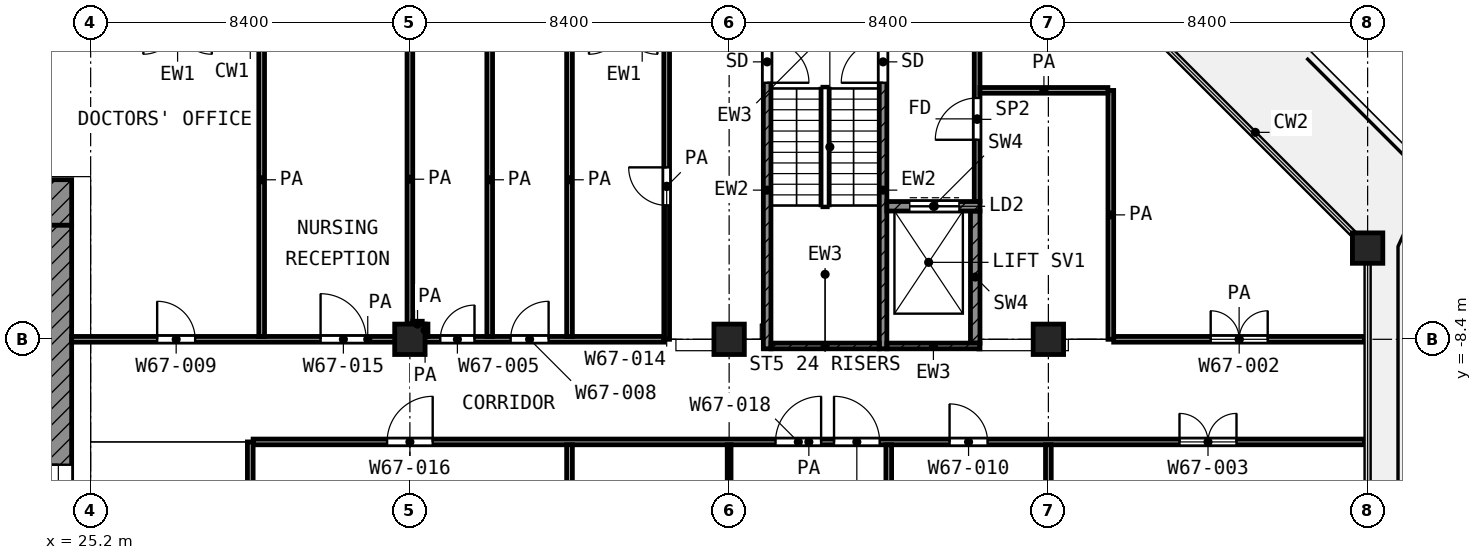
"""IFC4 building model, lengths in metres.
Left out: names, types, materials, properties, quantities, classifications, styles, units other than length and angle.
Written with IfcOpenShell. Run it as: python <this file> out.ifc"""

import sys

from ifc_helpers import new_model, si_unit, direction, frame, frame_2d, origin, origin_2d, place, context, subcontext, project, spatial, rectangle, extrude, element, fill, save


model = new_model("IFC4")
c1 = context("Model", 3, precision=1e-05, world=origin(), true_north=direction((0.0, 1.0)))
c2 = subcontext(c1, "Body", "Model", "MODEL_VIEW")
j1 = project(units=[si_unit("LENGTHUNIT", "METRE"), si_unit("PLANEANGLEUNIT", "RADIAN")], contexts=[c1])
p1 = place(None, origin())
s1 = spatial("IfcSite", under=j1, at=p1, CompositionType="ELEMENT")
p2 = place(p1, origin())
s2 = spatial("IfcBuilding", under=s1, at=p2, CompositionType="ELEMENT")
p3 = place(p2, frame((0.0, 0.0, 290.2)))
s3 = spatial("IfcBuildingStorey", under=s2, at=p3, CompositionType="ELEMENT", Elevation=290.2)
for number, where, z_axis, x_axis in (
    (1, (58.8, -6.0, 0.0), (0.0, 0.0, 1.0), (1.0, 0.0, 0.0)),
    (2, (33.6, -8.4, 0.0), (0.0, 0.0, 1.0), (1.0, 0.0, 0.0)),
    (3, (42.0, -8.4, 0.0), (0.0, 0.0, 1.0), (1.0, 0.0, 0.0)),
    (4, (50.4, -8.4, 0.0), (0.0, 0.0, 1.0), (1.0, 0.0, 0.0)),
):
    element("IfcColumn", number, at=place(p3, frame(where, z_axis=z_axis, x_axis=x_axis)), inside=s3, PredefinedType="COLUMN", context=c2, shape_type="SweptSolid", body=[
        extrude(rectangle(XDim=0.8, YDim=0.8, at=origin_2d()), origin(), (0.0, 0.0, 1.0), 4.2),
    ])
p4 = place(p3, frame((4.2, -4.8, 0.0), z_axis=(0.0, 0.0, 1.0), x_axis=(1.0, 0.0, 0.0)))
e5 = element("IfcWall", 5, at=p4, inside=s3, PredefinedType="SHEAR", context=c2, shape_type="SweptSolid", body=[
    extrude(rectangle(XDim=20.5, YDim=1.2, at=frame_2d((10.25, 0.0))), origin(), (0.0, 0.0, 1.0), 3.6),
])
p5 = place(p4, frame((1.95, 0.0, 0.0)))
e6 = element("IfcOpeningElement", 6, at=p5, cuts=e5, PredefinedType="OPENING", context=c2, shape_type="SweptSolid", body=[
    extrude(rectangle(XDim=1.1, YDim=2.1, at=frame_2d((0.55, 1.05))), frame((0.0, 0.61, 0.0), z_axis=(0.0, -1.0, 0.0), x_axis=(1.0, 0.0, 0.0)), (0.0, 0.0, 1.0), 1.22),
])
p6 = place(p4, frame((17.95, 0.0, 0.0)))
e7 = element("IfcOpeningElement", 7, at=p6, cuts=e5, PredefinedType="OPENING", context=c2, shape_type="SweptSolid", body=[
    extrude(rectangle(XDim=1.1, YDim=2.1, at=frame_2d((0.55, 1.05))), frame((0.0, 0.61, 0.0), z_axis=(0.0, -1.0, 0.0), x_axis=(1.0, 0.0, 0.0)), (0.0, 0.0, 1.0), 1.22),
])
p7 = place(p3, frame((24.35, -24.0, 0.0), z_axis=(0.0, 0.0, 1.0), x_axis=(0.0, 1.0, 0.0)))
e8 = element("IfcWall", 8, at=p7, inside=s3, PredefinedType="SHEAR", context=c2, shape_type="SweptSolid", body=[
    extrude(rectangle(XDim=18.6, YDim=0.7, at=frame_2d((9.3, 0.0))), origin(), (0.0, 0.0, 1.0), 3.6),
])
p8 = place(p7, frame((10.5, 0.0, 0.0)))
e9 = element("IfcOpeningElement", 9, at=p8, cuts=e8, PredefinedType="OPENING", context=c2, shape_type="SweptSolid", body=[
    extrude(rectangle(XDim=1.8, YDim=2.1, at=frame_2d((0.9, 1.05))), frame((0.0, 0.36, 0.0), z_axis=(0.0, -1.0, 0.0), x_axis=(1.0, 0.0, 0.0)), (0.0, 0.0, 1.0), 0.72),
])
p9 = place(p3, frame((43.0, -8.65, 0.0), z_axis=(0.0, 0.0, 1.0), x_axis=(0.0, 1.0, 0.0)))
e10 = element("IfcWall", 10, at=p9, inside=s3, PredefinedType="SHEAR", context=c2, shape_type="SweptSolid", body=[
    extrude(rectangle(XDim=8.35, YDim=0.2, at=frame_2d((4.175, 0.0))), origin(), (0.0, 0.0, 1.0), 3.6),
])
p10 = place(p9, frame((7.0, 0.0, 0.0)))
e11 = element("IfcOpeningElement", 11, at=p10, cuts=e10, PredefinedType="OPENING", context=c2, shape_type="SweptSolid", body=[
    extrude(rectangle(XDim=1.1, YDim=2.1, at=frame_2d((0.55, 1.05))), frame((0.0, 0.11, 0.0), z_axis=(0.0, -1.0, 0.0), x_axis=(1.0, 0.0, 0.0)), (0.0, 0.0, 1.0), 0.22),
])
p11 = place(p3, frame((46.05, -8.65, 0.0), z_axis=(0.0, 0.0, 1.0), x_axis=(0.0, 1.0, 0.0)))
e12 = element("IfcWall", 12, at=p11, inside=s3, PredefinedType="SHEAR", context=c2, shape_type="SweptSolid", body=[
    extrude(rectangle(XDim=8.35, YDim=0.2, at=frame_2d((4.175, 0.0))), origin(), (0.0, 0.0, 1.0), 3.6),
])
p12 = place(p11, frame((7.0, 0.0, 0.0)))
e13 = element("IfcOpeningElement", 13, at=p12, cuts=e12, PredefinedType="OPENING", context=c2, shape_type="SweptSolid", body=[
    extrude(rectangle(XDim=1.1, YDim=2.1, at=frame_2d((0.55, 1.05))), frame((0.0, 0.11, 0.0), z_axis=(0.0, -1.0, 0.0), x_axis=(1.0, 0.0, 0.0)), (0.0, 0.0, 1.0), 0.22),
])
p13 = place(p3, frame((43.1, -8.575, 0.0), z_axis=(0.0, 0.0, 1.0), x_axis=(1.0, 0.0, 0.0)))
e14 = element("IfcWall", 14, at=p13, inside=s3, PredefinedType="SHEAR", context=c2, shape_type="SweptSolid", body=[
    extrude(rectangle(XDim=2.85, YDim=0.15, at=frame_2d((1.425, 0.0))), origin(), (0.0, 0.0, 1.0), 3.6),
])
p14 = place(p3, frame((46.15, -8.575, 0.0), z_axis=(0.0, 0.0, 1.0), x_axis=(1.0, 0.0, 0.0)))
e15 = element("IfcWall", 15, at=p14, inside=s3, PredefinedType="SHEAR", context=c2, shape_type="SweptSolid", body=[
    extrude(rectangle(XDim=2.45, YDim=0.15, at=frame_2d((1.225, 0.0))), origin(), (0.0, 0.0, 1.0), 3.6),
])
p15 = place(p3, frame((46.15, -4.9, 0.0), z_axis=(0.0, 0.0, 1.0), x_axis=(1.0, 0.0, 0.0)))
e16 = element("IfcWall", 16, at=p15, inside=s3, PredefinedType="SHEAR", context=c2, shape_type="SweptSolid", body=[
    extrude(rectangle(XDim=2.45, YDim=0.25, at=frame_2d((1.225, 0.0))), origin(), (0.0, 0.0, 1.0), 3.6),
])
p16 = place(p15, frame((0.6, 0.0, 0.0)))
e17 = element("IfcOpeningElement", 17, at=p16, cuts=e16, PredefinedType="OPENING", context=c2, shape_type="SweptSolid", body=[
    extrude(rectangle(XDim=1.3, YDim=2.1, at=frame_2d((0.65, 1.05))), frame((0.0, 0.135, 0.0), z_axis=(0.0, -1.0, 0.0), x_axis=(1.0, 0.0, 0.0)), (0.0, 0.0, 1.0), 0.27),
])
p17 = place(p3, frame((48.475, -8.5, 0.0), z_axis=(0.0, 0.0, 1.0), x_axis=(0.0, 1.0, 0.0)))
e18 = element("IfcWall", 18, at=p17, inside=s3, PredefinedType="SHEAR", context=c2, shape_type="SweptSolid", body=[
    extrude(rectangle(XDim=3.475, YDim=0.25, at=frame_2d((1.738, 0.0))), origin(), (0.0, 0.0, 1.0), 3.6),
])
p18 = place(p3, frame((48.525, -4.775, 0.0), z_axis=(0.0, 0.0, 1.0), x_axis=(0.0, 1.0, 0.0)))
e19 = element("IfcWall", 19, at=p18, inside=s3, PredefinedType="PARTITIONING", context=c2, shape_type="SweptSolid", body=[
    extrude(rectangle(XDim=4.325, YDim=0.15, at=frame_2d((2.163, 0.0))), origin(), (0.0, 0.0, 1.0), 3.6),
])
p19 = place(p18, frame((1.625, 0.0, 0.0)))
e20 = element("IfcOpeningElement", 20, at=p19, cuts=e19, PredefinedType="OPENING", context=c2, shape_type="SweptSolid", body=[
    extrude(rectangle(XDim=1.1, YDim=2.1, at=frame_2d((0.55, 1.05))), frame((0.0, 0.085, 0.0), z_axis=(0.0, -1.0, 0.0), x_axis=(1.0, 0.0, 0.0)), (0.0, 0.0, 1.0), 0.17),
])
p20 = place(p3, frame((42.0, -20.35, 0.0), z_axis=(0.0, 0.0, 1.0), x_axis=(0.0, 1.0, 0.0)))
e21 = element("IfcWall", 21, at=p20, inside=s3, PredefinedType="PARTITIONING", context=c2, shape_type="SweptSolid", body=[
    extrude(rectangle(XDim=9.175, YDim=0.1, at=frame_2d((4.587, 0.0))), origin(), (0.0, 0.0, 1.0), 3.6),
])
p21 = place(p20, frame((4.1, 0.0, 0.0)))
e22 = element("IfcOpeningElement", 22, at=p21, cuts=e21, PredefinedType="OPENING", context=c2, shape_type="SweptSolid", body=[
    extrude(rectangle(XDim=1.0, YDim=2.1, at=frame_2d((0.5, 1.05))), frame((0.0, 0.06, 0.0), z_axis=(0.0, -1.0, 0.0), x_axis=(1.0, 0.0, 0.0)), (0.0, 0.0, 1.0), 0.12),
])
p22 = place(p3, frame((29.475, -11.1, 0.0), z_axis=(0.0, 0.0, 1.0), x_axis=(1.0, 0.0, 0.0)))
e23 = element("IfcWall", 23, at=p22, inside=s3, PredefinedType="PARTITIONING", context=c2, shape_type="SweptSolid", body=[
    extrude(rectangle(XDim=29.245, YDim=0.15, at=frame_2d((14.623, 0.0))), origin(), (0.0, 0.0, 1.0), 3.6),
])
p23 = place(p22, frame((3.525, 0.0, 0.0)))
e24 = element("IfcOpeningElement", 24, at=p23, cuts=e23, PredefinedType="OPENING", context=c2, shape_type="SweptSolid", body=[
    extrude(rectangle(XDim=1.2, YDim=2.1, at=frame_2d((0.6, 1.05))), frame((0.0, 0.085, 0.0), z_axis=(0.0, -1.0, 0.0), x_axis=(1.0, 0.0, 0.0)), (0.0, 0.0, 1.0), 0.17),
])
p24 = place(p22, frame((15.285, 0.0, 0.0)))
e25 = element("IfcOpeningElement", 25, at=p24, cuts=e23, PredefinedType="OPENING", context=c2, shape_type="SweptSolid", body=[
    extrude(rectangle(XDim=1.2, YDim=2.1, at=frame_2d((0.6, 1.05))), frame((0.0, 0.085, 0.0), z_axis=(0.0, -1.0, 0.0), x_axis=(1.0, 0.0, 0.0)), (0.0, 0.0, 1.0), 0.17),
])
p25 = place(p22, frame((13.745, 0.0, 0.0)))
e26 = element("IfcOpeningElement", 26, at=p25, cuts=e23, PredefinedType="OPENING", context=c2, shape_type="SweptSolid", body=[
    extrude(rectangle(XDim=1.2, YDim=2.1, at=frame_2d((0.6, 1.05))), frame((0.0, 0.085, 0.0), z_axis=(0.0, -1.0, 0.0), x_axis=(1.0, 0.0, 0.0)), (0.0, 0.0, 1.0), 0.17),
])
p26 = place(p22, frame((18.325, 0.0, 0.0)))
e27 = element("IfcOpeningElement", 27, at=p26, cuts=e23, PredefinedType="OPENING", context=c2, shape_type="SweptSolid", body=[
    extrude(rectangle(XDim=1.0, YDim=2.1, at=frame_2d((0.5, 1.05))), frame((0.0, 0.085, 0.0), z_axis=(0.0, -1.0, 0.0), x_axis=(1.0, 0.0, 0.0)), (0.0, 0.0, 1.0), 0.17),
])
p27 = place(p22, frame((24.375, 0.0, 0.0)))
e28 = element("IfcOpeningElement", 28, at=p27, cuts=e23, PredefinedType="OPENING", context=c2, shape_type="SweptSolid", body=[
    extrude(rectangle(XDim=1.5, YDim=2.1, at=frame_2d((0.75, 1.05))), frame((0.0, 0.085, 0.0), z_axis=(0.0, -1.0, 0.0), x_axis=(1.0, 0.0, 0.0)), (0.0, 0.0, 1.0), 0.17),
])
p28 = place(p3, frame((24.7, -8.4, 0.0), z_axis=(0.0, 0.0, 1.0), x_axis=(1.0, 0.0, 0.0)))
e29 = element("IfcWall", 29, at=p28, inside=s3, PredefinedType="PARTITIONING", context=c2, shape_type="SweptSolid", body=[
    extrude(rectangle(XDim=15.582, YDim=0.15, at=frame_2d((7.791, 0.0))), origin(), (0.0, 0.0, 1.0), 3.6),
])
p29 = place(p28, frame((2.25, 0.0, 0.0)))
e30 = element("IfcOpeningElement", 30, at=p29, cuts=e29, PredefinedType="OPENING", context=c2, shape_type="SweptSolid", body=[
    extrude(rectangle(XDim=1.0, YDim=2.1, at=frame_2d((0.5, 1.05))), frame((0.0, 0.085, 0.0), z_axis=(0.0, -1.0, 0.0), x_axis=(1.0, 0.0, 0.0)), (0.0, 0.0, 1.0), 0.17),
])
p30 = place(p28, frame((6.55, 0.0, 0.0)))
e31 = element("IfcOpeningElement", 31, at=p30, cuts=e29, PredefinedType="OPENING", context=c2, shape_type="SweptSolid", body=[
    extrude(rectangle(XDim=1.2, YDim=2.1, at=frame_2d((0.6, 1.05))), frame((0.0, 0.085, 0.0), z_axis=(0.0, -1.0, 0.0), x_axis=(1.0, 0.0, 0.0)), (0.0, 0.0, 1.0), 0.17),
])
p31 = place(p28, frame((9.7, 0.0, 0.0)))
e32 = element("IfcOpeningElement", 32, at=p31, cuts=e29, PredefinedType="OPENING", context=c2, shape_type="SweptSolid", body=[
    extrude(rectangle(XDim=0.9, YDim=2.1, at=frame_2d((0.45, 1.05))), frame((0.0, 0.085, 0.0), z_axis=(0.0, -1.0, 0.0), x_axis=(1.0, 0.0, 0.0)), (0.0, 0.0, 1.0), 0.17),
])
p32 = place(p28, frame((11.55, 0.0, 0.0)))
e33 = element("IfcOpeningElement", 33, at=p32, cuts=e29, PredefinedType="OPENING", context=c2, shape_type="SweptSolid", body=[
    extrude(rectangle(XDim=1.0, YDim=2.1, at=frame_2d((0.5, 1.05))), frame((0.0, 0.085, 0.0), z_axis=(0.0, -1.0, 0.0), x_axis=(1.0, 0.0, 0.0)), (0.0, 0.0, 1.0), 0.17),
])
p33 = place(p3, frame((52.118, -8.4, 0.0), z_axis=(0.0, 0.0, 1.0), x_axis=(1.0, 0.0, 0.0)))
e34 = element("IfcWall", 34, at=p33, inside=s3, PredefinedType="PARTITIONING", context=c2, shape_type="SweptSolid", body=[
    extrude(rectangle(XDim=6.602, YDim=0.15, at=frame_2d((3.301, 0.0))), origin(), (0.0, 0.0, 1.0), 3.6),
])
p34 = place(p33, frame((2.553, 0.0, 0.0)))
e35 = element("IfcOpeningElement", 35, at=p34, cuts=e34, PredefinedType="OPENING", context=c2, shape_type="SweptSolid", body=[
    extrude(rectangle(XDim=1.5, YDim=2.1, at=frame_2d((0.75, 1.05))), frame((0.0, 0.085, 0.0), z_axis=(0.0, -1.0, 0.0), x_axis=(1.0, 0.0, 0.0)), (0.0, 0.0, 1.0), 0.17),
])
p35 = place(p3, frame((33.677, -8.0, 0.0), z_axis=(0.0, 0.0, 1.0), x_axis=(1.0, 0.0, 0.0)))
e36 = element("IfcWall", 36, at=p35, inside=s3, PredefinedType="PARTITIONING", context=c2, shape_type="SweptSolid", body=[
    extrude(rectangle(XDim=0.248, YDim=0.15, at=frame_2d((0.124, 0.0))), origin(), (0.0, 0.0, 1.0), 3.6),
])
p36 = place(p3, frame((48.6, -1.85, 0.0), z_axis=(0.0, 0.0, 1.0), x_axis=(1.0, 0.0, 0.0)))
e37 = element("IfcWall", 37, at=p36, inside=s3, PredefinedType="PARTITIONING", context=c2, shape_type="SweptSolid", body=[
    extrude(rectangle(XDim=3.366, YDim=0.15, at=frame_2d((1.683, 0.0))), origin(), (0.0, 0.0, 1.0), 3.6),
])
p37 = place(p3, frame((29.4, -31.198, 0.0), z_axis=(0.0, 0.0, 1.0), x_axis=(0.0, 1.0, 0.0)))
e38 = element("IfcWall", 38, at=p37, inside=s3, PredefinedType="PARTITIONING", context=c2, shape_type="SweptSolid", body=[
    extrude(rectangle(XDim=20.098, YDim=0.15, at=frame_2d((10.049, 0.0))), origin(), (0.0, 0.0, 1.0), 3.6),
])
p38 = place(p3, frame((29.7, -8.325, 0.0), z_axis=(0.0, 0.0, 1.0), x_axis=(0.0, 1.0, 0.0)))
e39 = element("IfcWall", 39, at=p38, inside=s3, PredefinedType="PARTITIONING", context=c2, shape_type="SweptSolid", body=[
    extrude(rectangle(XDim=8.245, YDim=0.15, at=frame_2d((4.123, 0.0))), origin(), (0.0, 0.0, 1.0), 3.6),
])
p39 = place(p3, frame((33.6, -7.998, 0.0), z_axis=(0.0, 0.0, 1.0), x_axis=(0.0, 1.0, 0.0)))
e40 = element("IfcWall", 40, at=p39, inside=s3, PredefinedType="PARTITIONING", context=c2, shape_type="SweptSolid", body=[
    extrude(rectangle(XDim=7.62, YDim=0.15, at=frame_2d((3.81, 0.0))), origin(), (0.0, 0.0, 1.0), 3.6),
])
p40 = place(p3, frame((34.0, -8.325, 0.0), z_axis=(0.0, 0.0, 1.0), x_axis=(0.0, 1.0, 0.0)))
e41 = element("IfcWall", 41, at=p40, inside=s3, PredefinedType="PARTITIONING", context=c2, shape_type="SweptSolid", body=[
    extrude(rectangle(XDim=0.325, YDim=0.15, at=frame_2d((0.163, 0.0))), origin(), (0.0, 0.0, 1.0), 3.6),
])
p41 = place(p3, frame((35.7, -8.325, 0.0), z_axis=(0.0, 0.0, 1.0), x_axis=(0.0, 1.0, 0.0)))
e42 = element("IfcWall", 42, at=p41, inside=s3, PredefinedType="PARTITIONING", context=c2, shape_type="SweptSolid", body=[
    extrude(rectangle(XDim=8.245, YDim=0.15, at=frame_2d((4.123, 0.0))), origin(), (0.0, 0.0, 1.0), 3.6),
])
p42 = place(p3, frame((37.8, -25.12, 0.0), z_axis=(0.0, 0.0, 1.0), x_axis=(0.0, 1.0, 0.0)))
e43 = element("IfcWall", 43, at=p42, inside=s3, PredefinedType="PARTITIONING", context=c2, shape_type="SweptSolid", body=[
    extrude(rectangle(XDim=13.945, YDim=0.15, at=frame_2d((6.973, 0.0))), origin(), (0.0, 0.0, 1.0), 3.6),
])
p43 = place(p3, frame((37.8, -8.325, 0.0), z_axis=(0.0, 0.0, 1.0), x_axis=(0.0, 1.0, 0.0)))
e44 = element("IfcWall", 44, at=p43, inside=s3, PredefinedType="PARTITIONING", context=c2, shape_type="SweptSolid", body=[
    extrude(rectangle(XDim=8.245, YDim=0.15, at=frame_2d((4.123, 0.0))), origin(), (0.0, 0.0, 1.0), 3.6),
])
p44 = place(p3, frame((40.357, -8.4, 0.0), z_axis=(0.0, 0.0, 1.0), x_axis=(0.0, 1.0, 0.0)))
e45 = element("IfcWall", 45, at=p44, inside=s3, PredefinedType="PARTITIONING", context=c2, shape_type="SweptSolid", body=[
    extrude(rectangle(XDim=8.048, YDim=0.15, at=frame_2d((4.024, 0.0))), origin(), (0.0, 0.0, 1.0), 3.6),
])
p45 = place(p44, frame((3.524, 0.0, 0.0)))
e46 = element("IfcOpeningElement", 46, at=p45, cuts=e45, PredefinedType="OPENING", context=c2, shape_type="SweptSolid", body=[
    extrude(rectangle(XDim=1.0, YDim=2.1, at=frame_2d((0.5, 1.05))), frame((0.0, 0.085, 0.0), z_axis=(0.0, -1.0, 0.0), x_axis=(1.0, 0.0, 0.0)), (0.0, 0.0, 1.0), 0.17),
])
for number, where, z_axis, x_axis in (
    (47, (46.2, -25.12, 0.0), (0.0, 0.0, 1.0), (0.0, 1.0, 0.0)),
    (48, (50.4, -25.12, 0.0), (0.0, 0.0, 1.0), (0.0, 1.0, 0.0)),
):
    element("IfcWall", number, at=place(p3, frame(where, z_axis=z_axis, x_axis=x_axis)), inside=s3, PredefinedType="PARTITIONING", context=c2, shape_type="SweptSolid", body=[
        extrude(rectangle(XDim=13.945, YDim=0.15, at=frame_2d((6.973, 0.0))), origin(), (0.0, 0.0, 1.0), 3.6),
    ])
p46 = place(p3, frame((52.043, -8.4, 0.0), z_axis=(0.0, 0.0, 1.0), x_axis=(0.0, 1.0, 0.0)))
e49 = element("IfcWall", 49, at=p46, inside=s3, PredefinedType="PARTITIONING", context=c2, shape_type="SweptSolid", body=[
    extrude(rectangle(XDim=6.548, YDim=0.15, at=frame_2d((3.274, 0.0))), origin(), (0.0, 0.0, 1.0), 3.6),
])
p47 = place(p8, origin())
e50 = element("IfcDoor", 50, at=p47, inside=s3, OperationType="DOUBLE_DOOR_SINGLE_SWING", PredefinedType="DOOR", context=c2, shape_type="SweptSolid", body=[
    extrude(rectangle(XDim=1.8, YDim=2.1, at=frame_2d((0.9, 1.05))), frame((0.0, 0.025, 0.0), z_axis=(0.0, -1.0, 0.0), x_axis=(1.0, 0.0, 0.0)), (0.0, 0.0, 1.0), 0.05),
])
fill(e9, e50)
p48 = place(p10, frame((1.1, 0.0, 0.0), z_axis=(0.0, 0.0, 1.0), x_axis=(-1.0, 0.0, 0.0)))
e51 = element("IfcDoor", 51, at=p48, inside=s3, OperationType="SINGLE_SWING_LEFT", PredefinedType="DOOR", context=c2, shape_type="SweptSolid", body=[
    extrude(rectangle(XDim=1.1, YDim=2.1, at=frame_2d((0.55, 1.05))), frame((0.0, 0.025, 0.0), z_axis=(0.0, -1.0, 0.0), x_axis=(1.0, 0.0, 0.0)), (0.0, 0.0, 1.0), 0.05),
])
fill(e11, e51)
p49 = place(p12, origin())
e52 = element("IfcDoor", 52, at=p49, inside=s3, OperationType="SINGLE_SWING_LEFT", PredefinedType="DOOR", context=c2, shape_type="SweptSolid", body=[
    extrude(rectangle(XDim=1.1, YDim=2.1, at=frame_2d((0.55, 1.05))), frame((0.0, 0.025, 0.0), z_axis=(0.0, -1.0, 0.0), x_axis=(1.0, 0.0, 0.0)), (0.0, 0.0, 1.0), 0.05),
])
fill(e13, e52)
p50 = place(p16, origin())
e53 = element("IfcDoor", 53, at=p50, inside=s3, OperationType="DOUBLE_DOOR_SLIDING", PredefinedType="DOOR", context=c2, shape_type="SweptSolid", body=[
    extrude(rectangle(XDim=1.3, YDim=2.1, at=frame_2d((0.65, 1.05))), frame((0.0, 0.025, 0.0), z_axis=(0.0, -1.0, 0.0), x_axis=(1.0, 0.0, 0.0)), (0.0, 0.0, 1.0), 0.05),
])
fill(e17, e53)
p51 = place(p19, origin())
e54 = element("IfcDoor", 54, at=p51, inside=s3, OperationType="SINGLE_SWING_LEFT", PredefinedType="DOOR", context=c2, shape_type="SweptSolid", body=[
    extrude(rectangle(XDim=1.1, YDim=2.1, at=frame_2d((0.55, 1.05))), frame((0.0, 0.025, 0.0), z_axis=(0.0, -1.0, 0.0), x_axis=(1.0, 0.0, 0.0)), (0.0, 0.0, 1.0), 0.05),
])
fill(e20, e54)
p52 = place(p29, origin())
e55 = element("IfcDoor", 55, at=p52, inside=s3, OperationType="SINGLE_SWING_LEFT", PredefinedType="DOOR", context=c2, shape_type="SweptSolid", body=[
    extrude(rectangle(XDim=1.0, YDim=2.1, at=frame_2d((0.5, 1.05))), frame((0.0, 0.025, 0.0), z_axis=(0.0, -1.0, 0.0), x_axis=(1.0, 0.0, 0.0)), (0.0, 0.0, 1.0), 0.05),
])
fill(e30, e55)
p53 = place(p30, origin())
e56 = element("IfcDoor", 56, at=p53, inside=s3, OperationType="SINGLE_SWING_LEFT", PredefinedType="DOOR", context=c2, shape_type="SweptSolid", body=[
    extrude(rectangle(XDim=1.2, YDim=2.1, at=frame_2d((0.6, 1.05))), frame((0.0, 0.025, 0.0), z_axis=(0.0, -1.0, 0.0), x_axis=(1.0, 0.0, 0.0)), (0.0, 0.0, 1.0), 0.05),
])
fill(e31, e56)
p54 = place(p34, origin())
e57 = element("IfcDoor", 57, at=p54, inside=s3, OperationType="DOUBLE_DOOR_SINGLE_SWING", PredefinedType="DOOR", context=c2, shape_type="SweptSolid", body=[
    extrude(rectangle(XDim=1.5, YDim=2.1, at=frame_2d((0.75, 1.05))), frame((0.0, 0.025, 0.0), z_axis=(0.0, -1.0, 0.0), x_axis=(1.0, 0.0, 0.0)), (0.0, 0.0, 1.0), 0.05),
])
fill(e35, e57)
p55 = place(p23, origin())
e58 = element("IfcDoor", 58, at=p55, inside=s3, OperationType="SINGLE_SWING_RIGHT", PredefinedType="DOOR", context=c2, shape_type="SweptSolid", body=[
    extrude(rectangle(XDim=1.2, YDim=2.1, at=frame_2d((0.6, 1.05))), frame((0.0, 0.025, 0.0), z_axis=(0.0, -1.0, 0.0), x_axis=(1.0, 0.0, 0.0)), (0.0, 0.0, 1.0), 0.05),
])
fill(e24, e58)
p56 = place(p24, origin())
e59 = element("IfcDoor", 59, at=p56, inside=s3, OperationType="SINGLE_SWING_LEFT", PredefinedType="DOOR", context=c2, shape_type="SweptSolid", body=[
    extrude(rectangle(XDim=1.2, YDim=2.1, at=frame_2d((0.6, 1.05))), frame((0.0, 0.025, 0.0), z_axis=(0.0, -1.0, 0.0), x_axis=(1.0, 0.0, 0.0)), (0.0, 0.0, 1.0), 0.05),
])
fill(e25, e59)
p57 = place(p25, origin())
e60 = element("IfcDoor", 60, at=p57, inside=s3, OperationType="SINGLE_SWING_RIGHT", PredefinedType="DOOR", context=c2, shape_type="SweptSolid", body=[
    extrude(rectangle(XDim=1.2, YDim=2.1, at=frame_2d((0.6, 1.05))), frame((0.0, 0.025, 0.0), z_axis=(0.0, -1.0, 0.0), x_axis=(1.0, 0.0, 0.0)), (0.0, 0.0, 1.0), 0.05),
])
fill(e26, e60)
p58 = place(p26, origin())
e61 = element("IfcDoor", 61, at=p58, inside=s3, OperationType="SINGLE_SWING_LEFT", PredefinedType="DOOR", context=c2, shape_type="SweptSolid", body=[
    extrude(rectangle(XDim=1.0, YDim=2.1, at=frame_2d((0.5, 1.05))), frame((0.0, 0.025, 0.0), z_axis=(0.0, -1.0, 0.0), x_axis=(1.0, 0.0, 0.0)), (0.0, 0.0, 1.0), 0.05),
])
fill(e27, e61)
p59 = place(p27, origin())
e62 = element("IfcDoor", 62, at=p59, inside=s3, OperationType="DOUBLE_DOOR_SINGLE_SWING", PredefinedType="DOOR", context=c2, shape_type="SweptSolid", body=[
    extrude(rectangle(XDim=1.5, YDim=2.1, at=frame_2d((0.75, 1.05))), frame((0.0, 0.025, 0.0), z_axis=(0.0, -1.0, 0.0), x_axis=(1.0, 0.0, 0.0)), (0.0, 0.0, 1.0), 0.05),
])
fill(e28, e62)
p60 = place(p31, origin())
e63 = element("IfcDoor", 63, at=p60, inside=s3, OperationType="SINGLE_SWING_RIGHT", PredefinedType="DOOR", context=c2, shape_type="SweptSolid", body=[
    extrude(rectangle(XDim=0.9, YDim=2.1, at=frame_2d((0.45, 1.05))), frame((0.0, 0.025, 0.0), z_axis=(0.0, -1.0, 0.0), x_axis=(1.0, 0.0, 0.0)), (0.0, 0.0, 1.0), 0.05),
])
fill(e32, e63)
p61 = place(p32, origin())
e64 = element("IfcDoor", 64, at=p61, inside=s3, OperationType="SINGLE_SWING_RIGHT", PredefinedType="DOOR", context=c2, shape_type="SweptSolid", body=[
    extrude(rectangle(XDim=1.0, YDim=2.1, at=frame_2d((0.5, 1.05))), frame((0.0, 0.025, 0.0), z_axis=(0.0, -1.0, 0.0), x_axis=(1.0, 0.0, 0.0)), (0.0, 0.0, 1.0), 0.05),
])
fill(e33, e64)
p62 = place(p45, origin())
e65 = element("IfcDoor", 65, at=p62, inside=s3, OperationType="SINGLE_SWING_RIGHT", PredefinedType="DOOR", context=c2, shape_type="SweptSolid", body=[
    extrude(rectangle(XDim=1.0, YDim=2.1, at=frame_2d((0.5, 1.05))), frame((0.0, 0.025, 0.0), z_axis=(0.0, -1.0, 0.0), x_axis=(1.0, 0.0, 0.0)), (0.0, 0.0, 1.0), 0.05),
])
fill(e46, e65)
save(model, sys.argv[1])
